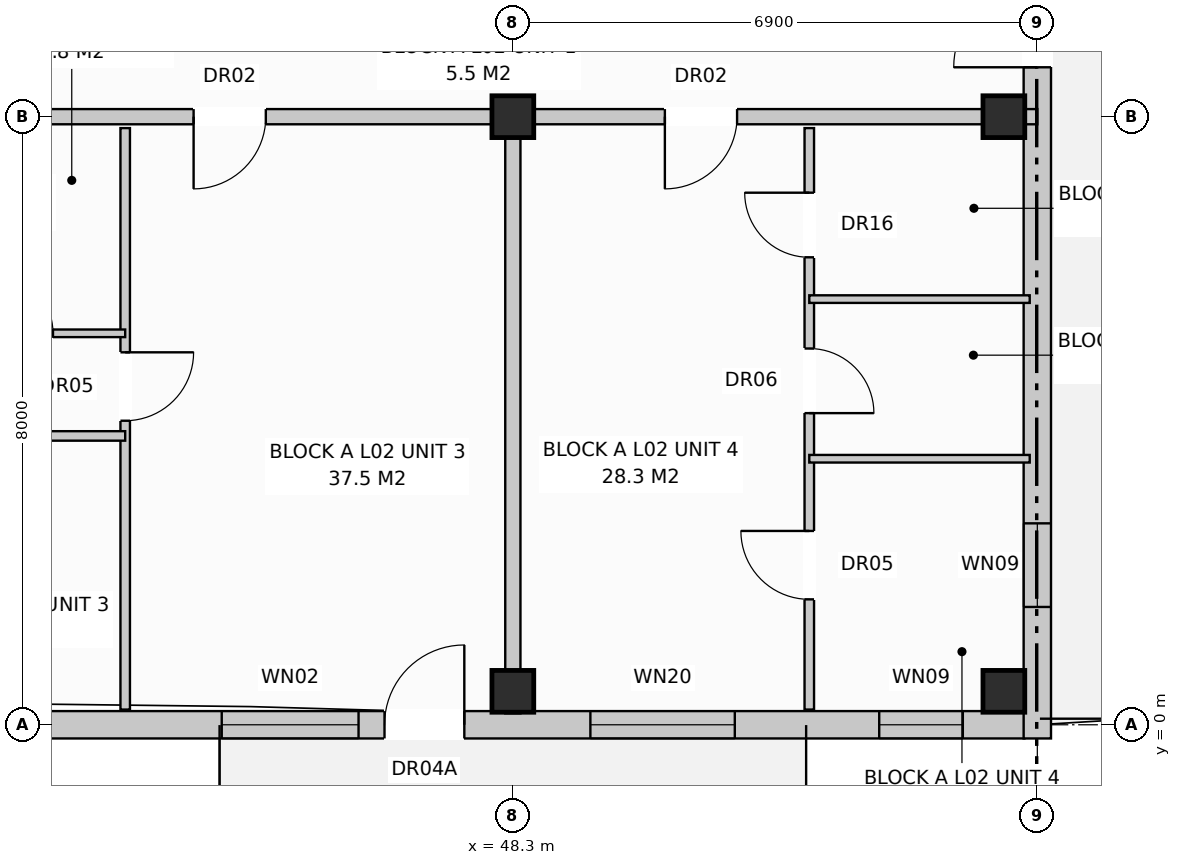
"""IFC4 building model, lengths in metres.
Left out: names, types, materials, properties, quantities, classifications, styles, units other than length and angle.
Written with IfcOpenShell. Run it as: python <this file> out.ifc"""

import sys

from ifc_helpers import new_model, si_unit, direction, frame, frame_2d, origin, origin_with_axes, origin_2d, place, context, subcontext, project, spatial, rectangle, extrude, element, fill, save


model = new_model("IFC4")
c1 = context("Model", 3, precision=1e-05, world=origin(), true_north=direction((0.0, 1.0)))
c2 = subcontext(c1, "Body", "Model", "MODEL_VIEW")
j1 = project(units=[si_unit("LENGTHUNIT", "METRE"), si_unit("PLANEANGLEUNIT", "RADIAN")], contexts=[c1])
p1 = place(None, origin())
s1 = spatial("IfcSite", under=j1, at=p1, CompositionType="ELEMENT")
p2 = place(p1, origin())
s2 = spatial("IfcBuilding", under=s1, at=p2, CompositionType="ELEMENT")
p3 = place(p2, frame((0.0, 0.0, 8.0)))
s3 = spatial("IfcBuildingStorey", under=s2, at=p3, CompositionType="ELEMENT", Elevation=8.0)
for number, where, z_axis, x_axis in (
    (1, (48.3, 0.44, 0.0), (0.0, 0.0, 1.0), (1.0, 0.0, 0.0)),
    (2, (48.3, 8.0, 0.0), (0.0, 0.0, 1.0), (1.0, 0.0, 0.0)),
    (3, (54.76, 0.44, 0.0), (0.0, 0.0, 1.0), (1.0, 0.0, 0.0)),
    (4, (54.76, 8.0, 0.0), (0.0, 0.0, 1.0), (1.0, 0.0, 0.0)),
):
    element("IfcColumn", number, at=place(p3, frame(where, z_axis=z_axis, x_axis=x_axis)), inside=s3, PredefinedType="COLUMN", context=c2, shape_type="SweptSolid", body=[
        extrude(rectangle(XDim=0.55, YDim=0.55, at=origin_2d()), origin(), (0.0, 0.0, 1.0), 3.2),
    ])
p4 = place(p3, frame((0.17, 0.0, 0.0), z_axis=(0.0, 0.0, 1.0), x_axis=(1.0, 0.0, 0.0)))
e5 = element("IfcWall", 5, at=p4, inside=s3, PredefinedType="STANDARD", context=c2, shape_type="SweptSolid", body=[
    extrude(rectangle(XDim=54.86, YDim=0.36, at=frame_2d((27.43, 0.0))), origin(), (0.0, 0.0, 1.0), 2.94),
])
p5 = place(p4, frame((3.736, 0.0, 0.0)))
e6 = element("IfcOpeningElement", 6, at=p5, cuts=e5, PredefinedType="OPENING", context=c2, shape_type="SweptSolid", body=[
    extrude(rectangle(XDim=1.05, YDim=2.12, at=frame_2d((0.525, 1.06))), frame((0.0, 0.192, 0.0), z_axis=(0.0, -1.0, 0.0), x_axis=(1.0, 0.0, 0.0)), (0.0, 0.0, 1.0), 0.384),
])
p6 = place(p4, frame((18.636, 0.0, 0.0)))
e7 = element("IfcOpeningElement", 7, at=p6, cuts=e5, PredefinedType="OPENING", context=c2, shape_type="SweptSolid", body=[
    extrude(rectangle(XDim=1.05, YDim=2.12, at=frame_2d((0.525, 1.06))), frame((0.0, 0.192, 0.0), z_axis=(0.0, -1.0, 0.0), x_axis=(1.0, 0.0, 0.0)), (0.0, 0.0, 1.0), 0.384),
])
p7 = place(p4, frame((32.636, 0.0, 0.0)))
e8 = element("IfcOpeningElement", 8, at=p7, cuts=e5, PredefinedType="OPENING", context=c2, shape_type="SweptSolid", body=[
    extrude(rectangle(XDim=1.05, YDim=2.12, at=frame_2d((0.525, 1.06))), frame((0.0, 0.192, 0.0), z_axis=(0.0, -1.0, 0.0), x_axis=(1.0, 0.0, 0.0)), (0.0, 0.0, 1.0), 0.384),
])
p8 = place(p4, frame((46.441, 0.0, 0.0)))
e9 = element("IfcOpeningElement", 9, at=p8, cuts=e5, PredefinedType="OPENING", context=c2, shape_type="SweptSolid", body=[
    extrude(rectangle(XDim=1.05, YDim=2.12, at=frame_2d((0.525, 1.06))), frame((0.0, 0.192, 0.0), z_axis=(0.0, -1.0, 0.0), x_axis=(1.0, 0.0, 0.0)), (0.0, 0.0, 1.0), 0.384),
])
p9 = place(p4, frame((1.95, 0.0, 0.72)))
e10 = element("IfcOpeningElement", 10, at=p9, cuts=e5, PredefinedType="OPENING", context=c2, shape_type="SweptSolid", body=[
    extrude(rectangle(XDim=1.1, YDim=1.5, at=frame_2d((0.55, 0.75))), frame((0.0, 0.192, 0.0), z_axis=(0.0, -1.0, 0.0), x_axis=(1.0, 0.0, 0.0)), (0.0, 0.0, 1.0), 0.384),
])
p10 = place(p4, frame((7.232, 0.0, 0.72)))
e11 = element("IfcOpeningElement", 11, at=p10, cuts=e5, PredefinedType="OPENING", context=c2, shape_type="SweptSolid", body=[
    extrude(rectangle(XDim=1.9, YDim=1.85, at=frame_2d((0.95, 0.925))), frame((0.0, 0.192, 0.0), z_axis=(0.0, -1.0, 0.0), x_axis=(1.0, 0.0, 0.0)), (0.0, 0.0, 1.0), 0.384),
])
p11 = place(p4, frame((10.85, 0.0, 0.72)))
e12 = element("IfcOpeningElement", 12, at=p11, cuts=e5, PredefinedType="OPENING", context=c2, shape_type="SweptSolid", body=[
    extrude(rectangle(XDim=1.1, YDim=1.5, at=frame_2d((0.55, 0.75))), frame((0.0, 0.192, 0.0), z_axis=(0.0, -1.0, 0.0), x_axis=(1.0, 0.0, 0.0)), (0.0, 0.0, 1.0), 0.384),
])
p12 = place(p4, frame((16.25, 0.0, 0.72)))
e13 = element("IfcOpeningElement", 13, at=p12, cuts=e5, PredefinedType="OPENING", context=c2, shape_type="SweptSolid", body=[
    extrude(rectangle(XDim=1.1, YDim=1.5, at=frame_2d((0.55, 0.75))), frame((0.0, 0.192, 0.0), z_axis=(0.0, -1.0, 0.0), x_axis=(1.0, 0.0, 0.0)), (0.0, 0.0, 1.0), 0.384),
])
p13 = place(p4, frame((21.55, 0.0, 0.72)))
e14 = element("IfcOpeningElement", 14, at=p13, cuts=e5, PredefinedType="OPENING", context=c2, shape_type="SweptSolid", body=[
    extrude(rectangle(XDim=1.9, YDim=1.85, at=frame_2d((0.95, 0.925))), frame((0.0, 0.192, 0.0), z_axis=(0.0, -1.0, 0.0), x_axis=(1.0, 0.0, 0.0)), (0.0, 0.0, 1.0), 0.384),
])
p14 = place(p4, frame((28.35, 0.0, 0.72)))
e15 = element("IfcOpeningElement", 15, at=p14, cuts=e5, PredefinedType="OPENING", context=c2, shape_type="SweptSolid", body=[
    extrude(rectangle(XDim=1.1, YDim=1.5, at=frame_2d((0.55, 0.75))), frame((0.0, 0.192, 0.0), z_axis=(0.0, -1.0, 0.0), x_axis=(1.0, 0.0, 0.0)), (0.0, 0.0, 1.0), 0.384),
])
p15 = place(p4, frame((30.8, 0.0, 0.85)))
e16 = element("IfcOpeningElement", 16, at=p15, cuts=e5, PredefinedType="OPENING", context=c2, shape_type="SweptSolid", body=[
    extrude(rectangle(XDim=1.5, YDim=1.65, at=frame_2d((0.75, 0.825))), frame((0.0, 0.192, 0.0), z_axis=(0.0, -1.0, 0.0), x_axis=(1.0, 0.0, 0.0)), (0.0, 0.0, 1.0), 0.384),
])
p16 = place(p4, frame((35.55, 0.0, 0.72)))
e17 = element("IfcOpeningElement", 17, at=p16, cuts=e5, PredefinedType="OPENING", context=c2, shape_type="SweptSolid", body=[
    extrude(rectangle(XDim=1.9, YDim=1.85, at=frame_2d((0.95, 0.925))), frame((0.0, 0.192, 0.0), z_axis=(0.0, -1.0, 0.0), x_axis=(1.0, 0.0, 0.0)), (0.0, 0.0, 1.0), 0.384),
])
p17 = place(p4, frame((39.25, 0.0, 0.72)))
e18 = element("IfcOpeningElement", 18, at=p17, cuts=e5, PredefinedType="OPENING", context=c2, shape_type="SweptSolid", body=[
    extrude(rectangle(XDim=1.1, YDim=1.5, at=frame_2d((0.55, 0.75))), frame((0.0, 0.192, 0.0), z_axis=(0.0, -1.0, 0.0), x_axis=(1.0, 0.0, 0.0)), (0.0, 0.0, 1.0), 0.384),
])
p18 = place(p4, frame((44.3, 0.0, 0.8)))
e19 = element("IfcOpeningElement", 19, at=p18, cuts=e5, PredefinedType="OPENING", context=c2, shape_type="SweptSolid", body=[
    extrude(rectangle(XDim=1.8, YDim=1.7, at=frame_2d((0.9, 0.85))), frame((0.0, 0.192, 0.0), z_axis=(0.0, -1.0, 0.0), x_axis=(1.0, 0.0, 0.0)), (0.0, 0.0, 1.0), 0.384),
])
p19 = place(p4, frame((49.15, 0.0, 0.72)))
e20 = element("IfcOpeningElement", 20, at=p19, cuts=e5, PredefinedType="OPENING", context=c2, shape_type="SweptSolid", body=[
    extrude(rectangle(XDim=1.9, YDim=1.85, at=frame_2d((0.95, 0.925))), frame((0.0, 0.192, 0.0), z_axis=(0.0, -1.0, 0.0), x_axis=(1.0, 0.0, 0.0)), (0.0, 0.0, 1.0), 0.384),
])
p20 = place(p4, frame((52.95, 0.0, 0.72)))
e21 = element("IfcOpeningElement", 21, at=p20, cuts=e5, PredefinedType="OPENING", context=c2, shape_type="SweptSolid", body=[
    extrude(rectangle(XDim=1.1, YDim=1.5, at=frame_2d((0.55, 0.75))), frame((0.0, 0.192, 0.0), z_axis=(0.0, -1.0, 0.0), x_axis=(1.0, 0.0, 0.0)), (0.0, 0.0, 1.0), 0.384),
])
p21 = place(p3, frame((55.2, -0.18, 0.0), z_axis=(0.0, 0.0, 1.0), x_axis=(0.0, 1.0, 0.0)))
e22 = element("IfcWall", 22, at=p21, inside=s3, PredefinedType="STANDARD", context=c2, shape_type="SweptSolid", body=[
    extrude(rectangle(XDim=18.76, YDim=0.36, at=frame_2d((9.38, 0.0))), origin(), (0.0, 0.0, 1.0), 2.94),
])
p22 = place(p21, frame((8.83, 0.0, 0.0)))
e23 = element("IfcOpeningElement", 23, at=p22, cuts=e22, PredefinedType="OPENING", context=c2, shape_type="SweptSolid", body=[
    extrude(rectangle(XDim=1.1, YDim=2.1, at=frame_2d((0.55, 1.05))), frame((0.0, 0.192, 0.0), z_axis=(0.0, -1.0, 0.0), x_axis=(1.0, 0.0, 0.0)), (0.0, 0.0, 1.0), 0.384),
])
p23 = place(p21, frame((1.73, 0.0, 0.72)))
e24 = element("IfcOpeningElement", 24, at=p23, cuts=e22, PredefinedType="OPENING", context=c2, shape_type="SweptSolid", body=[
    extrude(rectangle(XDim=1.1, YDim=1.5, at=frame_2d((0.55, 0.75))), frame((0.0, 0.192, 0.0), z_axis=(0.0, -1.0, 0.0), x_axis=(1.0, 0.0, 0.0)), (0.0, 0.0, 1.0), 0.384),
])
p24 = place(p21, frame((15.93, 0.0, 0.72)))
e25 = element("IfcOpeningElement", 25, at=p24, cuts=e22, PredefinedType="OPENING", context=c2, shape_type="SweptSolid", body=[
    extrude(rectangle(XDim=1.1, YDim=1.5, at=frame_2d((0.55, 0.75))), frame((0.0, 0.192, 0.0), z_axis=(0.0, -1.0, 0.0), x_axis=(1.0, 0.0, 0.0)), (0.0, 0.0, 1.0), 0.384),
])
p25 = place(p3, frame((48.3, 7.85, 0.0), z_axis=(0.0, 0.0, 1.0), x_axis=(0.0, -1.0, 0.0)))
e26 = element("IfcWall", 26, at=p25, inside=s3, PredefinedType="PARTITIONING", context=c2, shape_type="SweptSolid", body=[
    extrude(rectangle(XDim=7.7, YDim=0.2, at=frame_2d((3.85, 0.0))), origin(), (0.0, 0.0, 1.0), 2.38),
])
p26 = place(p3, frame((34.5, 8.0, 0.0), z_axis=(0.0, 0.0, 1.0), x_axis=(1.0, 0.0, 0.0)))
e27 = element("IfcWall", 27, at=p26, inside=s3, PredefinedType="PARTITIONING", context=c2, shape_type="SweptSolid", body=[
    extrude(rectangle(XDim=13.8, YDim=0.2, at=frame_2d((6.9, 0.0))), origin(), (0.0, 0.0, 1.0), 2.38),
])
p27 = place(p26, frame((9.6, 0.0, 0.0)))
e28 = element("IfcOpeningElement", 28, at=p27, cuts=e27, PredefinedType="OPENING", context=c2, shape_type="SweptSolid", body=[
    extrude(rectangle(XDim=0.95, YDim=2.15, at=frame_2d((0.475, 1.075))), frame((0.0, 0.112, 0.0), z_axis=(0.0, -1.0, 0.0), x_axis=(1.0, 0.0, 0.0)), (0.0, 0.0, 1.0), 0.224),
])
p28 = place(p3, frame((43.2, 7.85, 0.0), z_axis=(0.0, 0.0, 1.0), x_axis=(0.0, -1.0, 0.0)))
e29 = element("IfcWall", 29, at=p28, inside=s3, PredefinedType="PARTITIONING", context=c2, shape_type="SweptSolid", body=[
    extrude(rectangle(XDim=7.65, YDim=0.125, at=frame_2d((3.825, 0.0))), origin(), (0.0, 0.0, 1.0), 2.59),
])
p29 = place(p28, frame((2.95, 0.0, 0.0)))
e30 = element("IfcOpeningElement", 30, at=p29, cuts=e29, PredefinedType="OPENING", context=c2, shape_type="SweptSolid", body=[
    extrude(rectangle(XDim=0.9, YDim=2.1, at=frame_2d((0.45, 1.05))), frame((0.0, 0.074, 0.0), z_axis=(0.0, -1.0, 0.0), x_axis=(1.0, 0.0, 0.0)), (0.0, 0.0, 1.0), 0.149),
])
p30 = place(p3, frame((34.6, 5.15, 0.0), z_axis=(0.0, 0.0, 1.0), x_axis=(1.0, 0.0, 0.0)))
e31 = element("IfcWall", 31, at=p30, inside=s3, PredefinedType="PARTITIONING", context=c2, shape_type="SweptSolid", body=[
    extrude(rectangle(XDim=8.6, YDim=0.1, at=frame_2d((4.3, 0.0))), origin(), (0.0, 0.0, 1.0), 2.94),
])
p31 = place(p30, frame((1.4, 0.0, 0.0)))
e32 = element("IfcOpeningElement", 32, at=p31, cuts=e31, PredefinedType="OPENING", context=c2, shape_type="SweptSolid", body=[
    extrude(rectangle(XDim=0.85, YDim=2.05, at=frame_2d((0.425, 1.025))), frame((0.0, 0.062, 0.0), z_axis=(0.0, -1.0, 0.0), x_axis=(1.0, 0.0, 0.0)), (0.0, 0.0, 1.0), 0.124),
])
p32 = place(p30, frame((4.65, 0.0, 0.0)))
e33 = element("IfcOpeningElement", 33, at=p32, cuts=e31, PredefinedType="OPENING", context=c2, shape_type="SweptSolid", body=[
    extrude(rectangle(XDim=0.85, YDim=2.05, at=frame_2d((0.425, 1.025))), frame((0.0, 0.062, 0.0), z_axis=(0.0, -1.0, 0.0), x_axis=(1.0, 0.0, 0.0)), (0.0, 0.0, 1.0), 0.124),
])
p33 = place(p30, frame((6.8, 0.0, 0.0)))
e34 = element("IfcOpeningElement", 34, at=p33, cuts=e31, PredefinedType="OPENING", context=c2, shape_type="SweptSolid", body=[
    extrude(rectangle(XDim=0.85, YDim=2.1, at=frame_2d((0.425, 1.05))), frame((0.0, 0.062, 0.0), z_axis=(0.0, -1.0, 0.0), x_axis=(1.0, 0.0, 0.0)), (0.0, 0.0, 1.0), 0.124),
])
p34 = place(p3, frame((38.7, 3.8, 0.0), z_axis=(0.0, 0.0, 1.0), x_axis=(1.0, 0.0, 0.0)))
e35 = element("IfcWall", 35, at=p34, inside=s3, PredefinedType="PARTITIONING", context=c2, shape_type="SweptSolid", body=[
    extrude(rectangle(XDim=4.5, YDim=0.125, at=frame_2d((2.25, 0.0))), origin(), (0.0, 0.0, 1.0), 2.94),
])
p35 = place(p34, frame((1.6, 0.0, 0.0)))
e36 = element("IfcOpeningElement", 36, at=p35, cuts=e35, PredefinedType="OPENING", context=c2, shape_type="SweptSolid", body=[
    extrude(rectangle(XDim=0.9, YDim=2.1, at=frame_2d((0.45, 1.05))), frame((0.0, 0.074, 0.0), z_axis=(0.0, -1.0, 0.0), x_axis=(1.0, 0.0, 0.0)), (0.0, 0.0, 1.0), 0.149),
])
p36 = place(p3, frame((48.3, 8.0, 0.0), z_axis=(0.0, 0.0, 1.0), x_axis=(1.0, 0.0, 0.0)))
e37 = element("IfcWall", 37, at=p36, inside=s3, PredefinedType="PARTITIONING", context=c2, shape_type="SweptSolid", body=[
    extrude(rectangle(XDim=6.9, YDim=0.2, at=frame_2d((3.45, 0.0))), origin(), (0.0, 0.0, 1.0), 2.38),
])
p37 = place(p36, frame((2.0, 0.0, 0.0)))
e38 = element("IfcOpeningElement", 38, at=p37, cuts=e37, PredefinedType="OPENING", context=c2, shape_type="SweptSolid", body=[
    extrude(rectangle(XDim=0.95, YDim=2.15, at=frame_2d((0.475, 1.075))), frame((0.0, 0.112, 0.0), z_axis=(0.0, -1.0, 0.0), x_axis=(1.0, 0.0, 0.0)), (0.0, 0.0, 1.0), 0.224),
])
p38 = place(p3, frame((52.2, 7.85, 0.0), z_axis=(0.0, 0.0, 1.0), x_axis=(0.0, -1.0, 0.0)))
e39 = element("IfcWall", 39, at=p38, inside=s3, PredefinedType="PARTITIONING", context=c2, shape_type="SweptSolid", body=[
    extrude(rectangle(XDim=7.65, YDim=0.125, at=frame_2d((3.825, 0.0))), origin(), (0.0, 0.0, 1.0), 2.94),
])
p39 = place(p38, frame((0.85, 0.0, 0.0)))
e40 = element("IfcOpeningElement", 40, at=p39, cuts=e39, PredefinedType="OPENING", context=c2, shape_type="SweptSolid", body=[
    extrude(rectangle(XDim=0.85, YDim=2.1, at=frame_2d((0.425, 1.05))), frame((0.0, 0.074, 0.0), z_axis=(0.0, -1.0, 0.0), x_axis=(1.0, 0.0, 0.0)), (0.0, 0.0, 1.0), 0.149),
])
p40 = place(p38, frame((2.9, 0.0, 0.0)))
e41 = element("IfcOpeningElement", 41, at=p40, cuts=e39, PredefinedType="OPENING", context=c2, shape_type="SweptSolid", body=[
    extrude(rectangle(XDim=0.85, YDim=2.05, at=frame_2d((0.425, 1.025))), frame((0.0, 0.074, 0.0), z_axis=(0.0, -1.0, 0.0), x_axis=(1.0, 0.0, 0.0)), (0.0, 0.0, 1.0), 0.149),
])
p41 = place(p38, frame((5.3, 0.0, 0.0)))
e42 = element("IfcOpeningElement", 42, at=p41, cuts=e39, PredefinedType="OPENING", context=c2, shape_type="SweptSolid", body=[
    extrude(rectangle(XDim=0.9, YDim=2.1, at=frame_2d((0.45, 1.05))), frame((0.0, 0.074, 0.0), z_axis=(0.0, -1.0, 0.0), x_axis=(1.0, 0.0, 0.0)), (0.0, 0.0, 1.0), 0.149),
])
for number, where, z_axis, x_axis in (
    (43, (52.2, 5.6, 0.0), (0.0, 0.0, 1.0), (1.0, 0.0, 0.0)),
    (44, (52.2, 3.5, 0.0), (0.0, 0.0, 1.0), (1.0, 0.0, 0.0)),
):
    element("IfcWall", number, at=place(p3, frame(where, z_axis=z_axis, x_axis=x_axis)), inside=s3, PredefinedType="PARTITIONING", context=c2, shape_type="SweptSolid", body=[
        extrude(rectangle(XDim=2.9, YDim=0.1, at=frame_2d((1.45, 0.0))), origin(), (0.0, 0.0, 1.0), 2.94),
    ])
p42 = place(p8, origin_with_axes())
e45 = element("IfcDoor", 45, at=p42, inside=s3, OperationType="SINGLE_SWING_RIGHT", PredefinedType="DOOR", context=c2, shape_type="SweptSolid", body=[
    extrude(rectangle(XDim=1.05, YDim=2.12, at=frame_2d((0.525, 1.06))), frame((0.0, 0.025, 0.0), z_axis=(0.0, -1.0, 0.0), x_axis=(1.0, 0.0, 0.0)), (0.0, 0.0, 1.0), 0.05),
])
fill(e9, e45)
p43 = place(p18, origin_with_axes())
e46 = element("IfcWindow", 46, at=p43, inside=s3, PartitioningType="SINGLE_PANEL", PredefinedType="WINDOW", context=c2, shape_type="SweptSolid", body=[
    extrude(rectangle(XDim=1.8, YDim=1.7, at=frame_2d((0.9, 0.85))), frame((0.0, 0.03, 0.0), z_axis=(0.0, -1.0, 0.0), x_axis=(1.0, 0.0, 0.0)), (0.0, 0.0, 1.0), 0.06),
])
fill(e19, e46)
p44 = place(p19, origin_with_axes())
e47 = element("IfcWindow", 47, at=p44, inside=s3, PartitioningType="SINGLE_PANEL", PredefinedType="WINDOW", context=c2, shape_type="SweptSolid", body=[
    extrude(rectangle(XDim=1.9, YDim=1.85, at=frame_2d((0.95, 0.925))), frame((0.0, 0.03, 0.0), z_axis=(0.0, -1.0, 0.0), x_axis=(1.0, 0.0, 0.0)), (0.0, 0.0, 1.0), 0.06),
])
fill(e20, e47)
p45 = place(p20, origin_with_axes())
e48 = element("IfcWindow", 48, at=p45, inside=s3, PartitioningType="SINGLE_PANEL", PredefinedType="WINDOW", context=c2, shape_type="SweptSolid", body=[
    extrude(rectangle(XDim=1.1, YDim=1.5, at=frame_2d((0.55, 0.75))), frame((0.0, 0.03, 0.0), z_axis=(0.0, -1.0, 0.0), x_axis=(1.0, 0.0, 0.0)), (0.0, 0.0, 1.0), 0.06),
])
fill(e21, e48)
p46 = place(p22, origin_with_axes())
e49 = element("IfcDoor", 49, at=p46, inside=s3, OperationType="SINGLE_SWING_LEFT", PredefinedType="DOOR", context=c2, shape_type="SweptSolid", body=[
    extrude(rectangle(XDim=1.1, YDim=2.1, at=frame_2d((0.55, 1.05))), frame((0.0, 0.025, 0.0), z_axis=(0.0, -1.0, 0.0), x_axis=(1.0, 0.0, 0.0)), (0.0, 0.0, 1.0), 0.05),
])
fill(e23, e49)
p47 = place(p23, origin_with_axes())
e50 = element("IfcWindow", 50, at=p47, inside=s3, PartitioningType="SINGLE_PANEL", PredefinedType="WINDOW", context=c2, shape_type="SweptSolid", body=[
    extrude(rectangle(XDim=1.1, YDim=1.5, at=frame_2d((0.55, 0.75))), frame((0.0, 0.03, 0.0), z_axis=(0.0, -1.0, 0.0), x_axis=(1.0, 0.0, 0.0)), (0.0, 0.0, 1.0), 0.06),
])
fill(e24, e50)
p48 = place(p27, frame((0.95, 0.0, 0.0), z_axis=(0.0, 0.0, 1.0), x_axis=(-1.0, 0.0, 0.0)))
e51 = element("IfcDoor", 51, at=p48, inside=s3, OperationType="SINGLE_SWING_LEFT", PredefinedType="DOOR", context=c2, shape_type="SweptSolid", body=[
    extrude(rectangle(XDim=0.95, YDim=2.15, at=frame_2d((0.475, 1.075))), frame((0.0, 0.025, 0.0), z_axis=(0.0, -1.0, 0.0), x_axis=(1.0, 0.0, 0.0)), (0.0, 0.0, 1.0), 0.05),
])
fill(e28, e51)
p49 = place(p29, origin_with_axes())
e52 = element("IfcDoor", 52, at=p49, inside=s3, OperationType="SINGLE_SWING_LEFT", PredefinedType="DOOR", context=c2, shape_type="SweptSolid", body=[
    extrude(rectangle(XDim=0.9, YDim=2.1, at=frame_2d((0.45, 1.05))), frame((0.0, 0.025, 0.0), z_axis=(0.0, -1.0, 0.0), x_axis=(1.0, 0.0, 0.0)), (0.0, 0.0, 1.0), 0.05),
])
fill(e30, e52)
p50 = place(p33, origin_with_axes())
e53 = element("IfcDoor", 53, at=p50, inside=s3, OperationType="SINGLE_SWING_LEFT", PredefinedType="DOOR", context=c2, shape_type="SweptSolid", body=[
    extrude(rectangle(XDim=0.85, YDim=2.1, at=frame_2d((0.425, 1.05))), frame((0.0, 0.025, 0.0), z_axis=(0.0, -1.0, 0.0), x_axis=(1.0, 0.0, 0.0)), (0.0, 0.0, 1.0), 0.05),
])
fill(e34, e53)
p51 = place(p37, frame((0.95, 0.0, 0.0), z_axis=(0.0, 0.0, 1.0), x_axis=(-1.0, 0.0, 0.0)))
e54 = element("IfcDoor", 54, at=p51, inside=s3, OperationType="SINGLE_SWING_LEFT", PredefinedType="DOOR", context=c2, shape_type="SweptSolid", body=[
    extrude(rectangle(XDim=0.95, YDim=2.15, at=frame_2d((0.475, 1.075))), frame((0.0, 0.025, 0.0), z_axis=(0.0, -1.0, 0.0), x_axis=(1.0, 0.0, 0.0)), (0.0, 0.0, 1.0), 0.05),
])
fill(e38, e54)
p52 = place(p39, frame((0.85, 0.0, 0.0), z_axis=(0.0, 0.0, 1.0), x_axis=(-1.0, 0.0, 0.0)))
e55 = element("IfcDoor", 55, at=p52, inside=s3, OperationType="SINGLE_SWING_LEFT", PredefinedType="DOOR", context=c2, shape_type="SweptSolid", body=[
    extrude(rectangle(XDim=0.85, YDim=2.1, at=frame_2d((0.425, 1.05))), frame((0.0, 0.025, 0.0), z_axis=(0.0, -1.0, 0.0), x_axis=(1.0, 0.0, 0.0)), (0.0, 0.0, 1.0), 0.05),
])
fill(e40, e55)
p53 = place(p40, origin_with_axes())
e56 = element("IfcDoor", 56, at=p53, inside=s3, OperationType="SINGLE_SWING_RIGHT", PredefinedType="DOOR", context=c2, shape_type="SweptSolid", body=[
    extrude(rectangle(XDim=0.85, YDim=2.05, at=frame_2d((0.425, 1.025))), frame((0.0, 0.025, 0.0), z_axis=(0.0, -1.0, 0.0), x_axis=(1.0, 0.0, 0.0)), (0.0, 0.0, 1.0), 0.05),
])
fill(e41, e56)
p54 = place(p41, frame((0.9, 0.0, 0.0), z_axis=(0.0, 0.0, 1.0), x_axis=(-1.0, 0.0, 0.0)))
e57 = element("IfcDoor", 57, at=p54, inside=s3, OperationType="SINGLE_SWING_LEFT", PredefinedType="DOOR", context=c2, shape_type="SweptSolid", body=[
    extrude(rectangle(XDim=0.9, YDim=2.1, at=frame_2d((0.45, 1.05))), frame((0.0, 0.025, 0.0), z_axis=(0.0, -1.0, 0.0), x_axis=(1.0, 0.0, 0.0)), (0.0, 0.0, 1.0), 0.05),
])
fill(e42, e57)
save(model, sys.argv[1])
